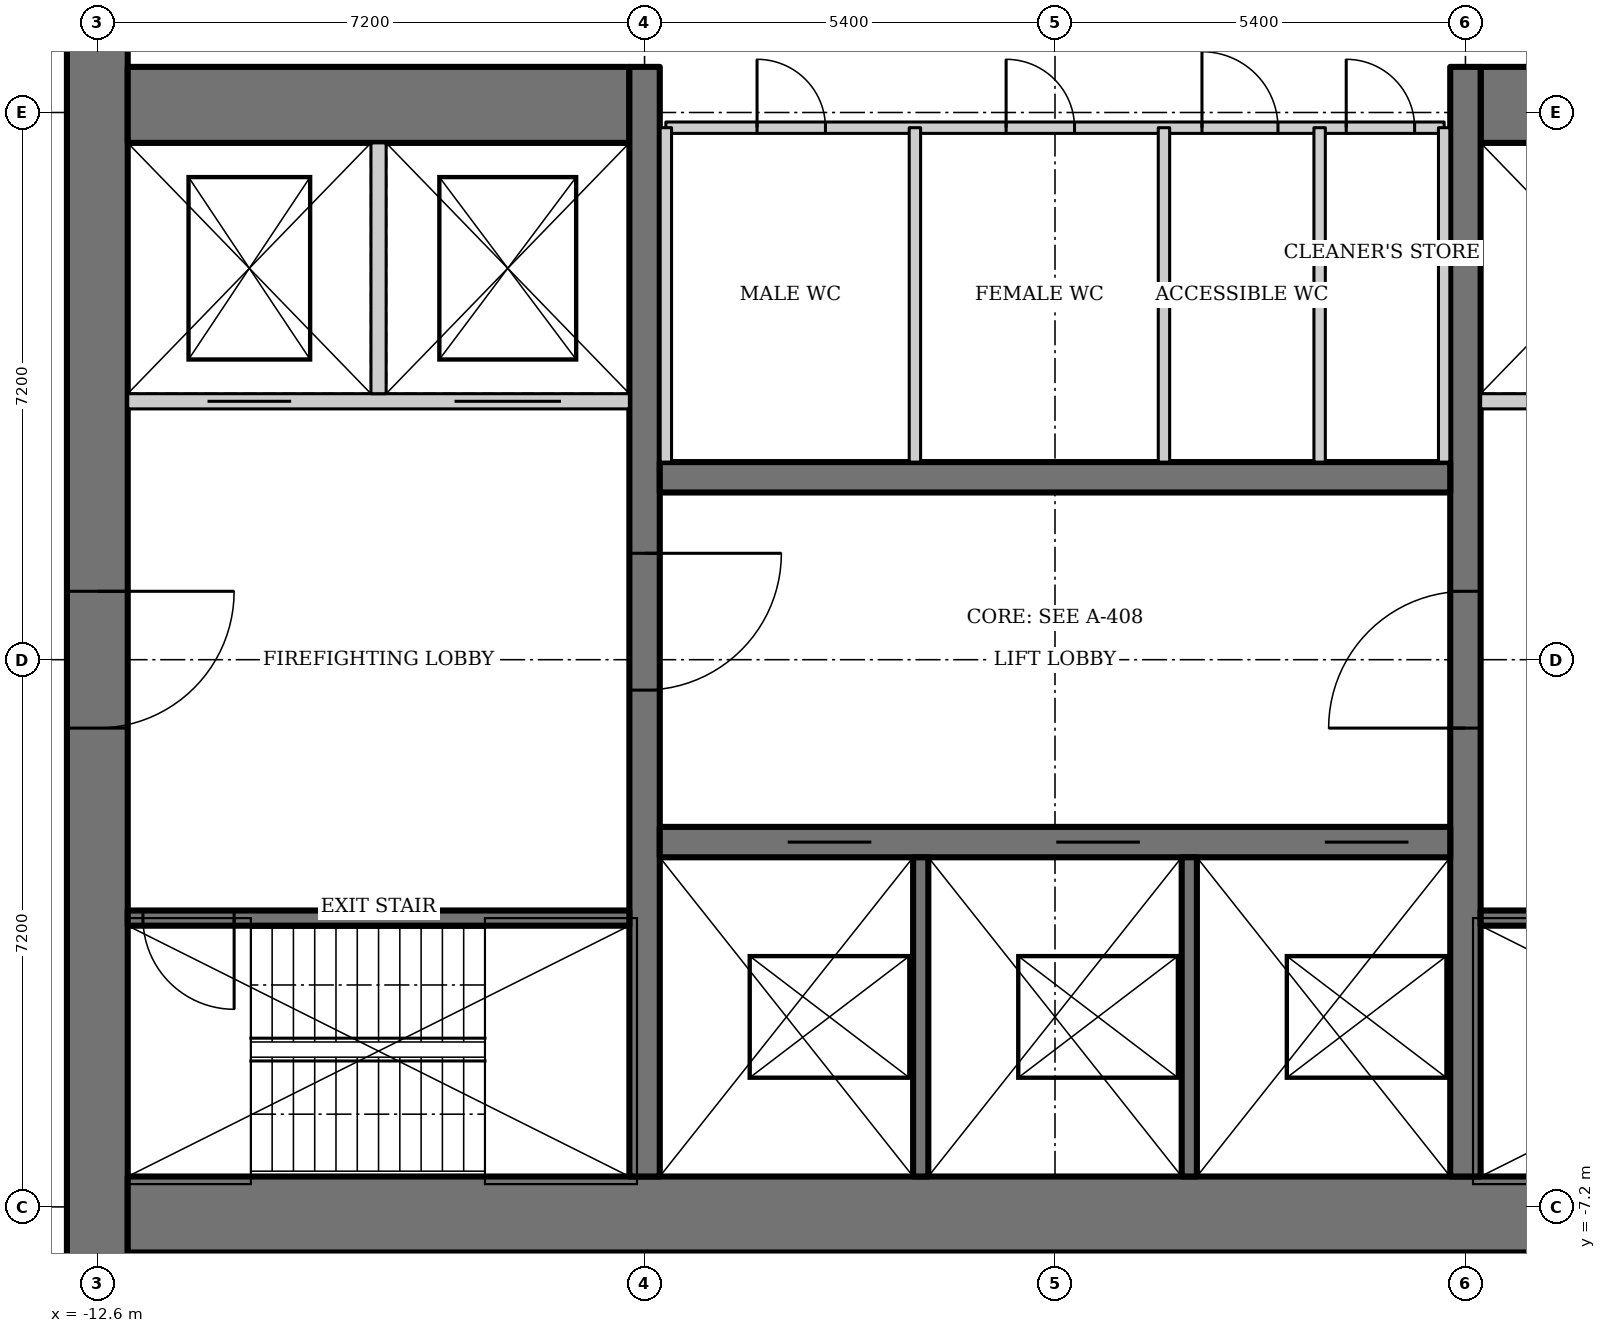
"""IFC4 building model, lengths in metres.
Left out: names, types, materials, properties, quantities, classifications, styles, units other than length and angle.
Written with IfcOpenShell. Run it as: python <this file> out.ifc"""

import sys

from ifc_helpers import new_model, si_unit, direction, frame, frame_2d, origin, place, context, subcontext, project, spatial, rectangle, extrude, element, fill, save


model = new_model("IFC4")
c1 = context("Model", 3, precision=1e-05, world=origin(), true_north=direction((0.0, 1.0)))
c2 = subcontext(c1, "Body", "Model", "MODEL_VIEW")
j1 = project(units=[si_unit("LENGTHUNIT", "METRE"), si_unit("PLANEANGLEUNIT", "RADIAN")], contexts=[c1])
p1 = place(None, origin())
s1 = spatial("IfcSite", under=j1, at=p1, CompositionType="ELEMENT")
p2 = place(p1, origin())
s2 = spatial("IfcBuilding", under=s1, at=p2, CompositionType="ELEMENT")
p3 = place(p2, frame((0.0, 0.0, 232.6)))
s3 = spatial("IfcBuildingStorey", under=s2, at=p3, CompositionType="ELEMENT", Elevation=232.6)
p4 = place(p3, frame((-12.6, 13.0, 0.0), z_axis=(0.0, 0.0, 1.0), x_axis=(0.0, -1.0, 0.0)))
e1 = element("IfcWall", 1, at=p4, inside=s3, PredefinedType="SHEAR", context=c2, shape_type="SweptSolid", body=[
    extrude(rectangle(XDim=26.0, YDim=0.8, at=frame_2d((13.0, 0.0))), origin(), (0.0, 0.0, 1.0), 4.2),
])
p5 = place(p4, frame((12.1, 0.0, 0.0)))
e2 = element("IfcOpeningElement", 2, at=p5, cuts=e1, PredefinedType="OPENING", context=c2, shape_type="SweptSolid", body=[
    extrude(rectangle(XDim=1.8, YDim=2.1, at=frame_2d((0.9, 1.05))), frame((0.0, 0.41, 0.0), z_axis=(0.0, -1.0, 0.0), x_axis=(1.0, 0.0, 0.0)), (0.0, 0.0, 1.0), 0.82),
])
p6 = place(p3, frame((-12.2, -7.3, 0.0), z_axis=(0.0, 0.0, 1.0), x_axis=(1.0, 0.0, 0.0)))
e3 = element("IfcWall", 3, at=p6, inside=s3, PredefinedType="SHEAR", context=c2, shape_type="SweptSolid", body=[
    extrude(rectangle(XDim=24.4, YDim=1.0, at=frame_2d((12.2, 0.0))), origin(), (0.0, 0.0, 1.0), 4.2),
])
for number, where, z_axis, x_axis in (
    (4, (12.2, 7.3, 0.0), (0.0, 0.0, 1.0), (-1.0, 0.0, 0.0)),
    (5, (-5.6, 7.3, 0.0), (0.0, 0.0, 1.0), (-1.0, 0.0, 0.0)),
):
    element("IfcWall", number, at=place(p3, frame(where, z_axis=z_axis, x_axis=x_axis)), inside=s3, PredefinedType="SHEAR", context=c2, shape_type="SweptSolid", body=[
        extrude(rectangle(XDim=6.6, YDim=1.0, at=frame_2d((3.3, 0.0))), origin(), (0.0, 0.0, 1.0), 4.2),
    ])
p7 = place(p3, frame((5.4, -6.8, 0.0), z_axis=(0.0, 0.0, 1.0), x_axis=(0.0, 1.0, 0.0)))
e6 = element("IfcWall", 6, at=p7, inside=s3, PredefinedType="SHEAR", context=c2, shape_type="SweptSolid", body=[
    extrude(rectangle(XDim=14.6, YDim=0.4, at=frame_2d((7.3, 0.0))), origin(), (0.0, 0.0, 1.0), 4.2),
])
p8 = place(p7, frame((5.9, 0.0, 0.0)))
e7 = element("IfcOpeningElement", 7, at=p8, cuts=e6, PredefinedType="OPENING", context=c2, shape_type="SweptSolid", body=[
    extrude(rectangle(XDim=1.8, YDim=2.1, at=frame_2d((0.9, 1.05))), frame((0.0, 0.21, 0.0), z_axis=(0.0, -1.0, 0.0), x_axis=(1.0, 0.0, 0.0)), (0.0, 0.0, 1.0), 0.42),
])
p9 = place(p3, frame((-5.4, 7.8, 0.0), z_axis=(0.0, 0.0, 1.0), x_axis=(0.0, -1.0, 0.0)))
e8 = element("IfcWall", 8, at=p9, inside=s3, PredefinedType="SHEAR", context=c2, shape_type="SweptSolid", body=[
    extrude(rectangle(XDim=14.6, YDim=0.4, at=frame_2d((7.3, 0.0))), origin(), (0.0, 0.0, 1.0), 4.2),
])
p10 = place(p9, frame((6.4, 0.0, 0.0)))
e9 = element("IfcOpeningElement", 9, at=p10, cuts=e8, PredefinedType="OPENING", context=c2, shape_type="SweptSolid", body=[
    extrude(rectangle(XDim=1.8, YDim=2.1, at=frame_2d((0.9, 1.05))), frame((0.0, 0.21, 0.0), z_axis=(0.0, -1.0, 0.0), x_axis=(1.0, 0.0, 0.0)), (0.0, 0.0, 1.0), 0.42),
])
p11 = place(p3, frame((-5.2, -2.4, 0.0), z_axis=(0.0, 0.0, 1.0), x_axis=(1.0, 0.0, 0.0)))
e10 = element("IfcWall", 10, at=p11, inside=s3, PredefinedType="SHEAR", context=c2, shape_type="SweptSolid", body=[
    extrude(rectangle(XDim=10.4, YDim=0.4, at=frame_2d((5.2, 0.0))), origin(), (0.0, 0.0, 1.0), 4.2),
])
p12 = place(p11, frame((1.683, 0.0, 0.0)))
e11 = element("IfcOpeningElement", 11, at=p12, cuts=e10, PredefinedType="OPENING", context=c2, shape_type="SweptSolid", body=[
    extrude(rectangle(XDim=1.1, YDim=2.2, at=frame_2d((0.55, 1.1))), frame((0.0, 0.21, 0.0), z_axis=(0.0, -1.0, 0.0), x_axis=(1.0, 0.0, 0.0)), (0.0, 0.0, 1.0), 0.42),
])
p13 = place(p11, frame((5.217, 0.0, 0.0)))
e12 = element("IfcOpeningElement", 12, at=p13, cuts=e10, PredefinedType="OPENING", context=c2, shape_type="SweptSolid", body=[
    extrude(rectangle(XDim=1.1, YDim=2.2, at=frame_2d((0.55, 1.1))), frame((0.0, 0.21, 0.0), z_axis=(0.0, -1.0, 0.0), x_axis=(1.0, 0.0, 0.0)), (0.0, 0.0, 1.0), 0.42),
])
p14 = place(p11, frame((8.75, 0.0, 0.0)))
e13 = element("IfcOpeningElement", 13, at=p14, cuts=e10, PredefinedType="OPENING", context=c2, shape_type="SweptSolid", body=[
    extrude(rectangle(XDim=1.1, YDim=2.2, at=frame_2d((0.55, 1.1))), frame((0.0, 0.21, 0.0), z_axis=(0.0, -1.0, 0.0), x_axis=(1.0, 0.0, 0.0)), (0.0, 0.0, 1.0), 0.42),
])
for number, where, z_axis, x_axis in (
    (14, (-1.767, -2.6, 0.0), (0.0, 0.0, 1.0), (0.0, -1.0, 0.0)),
    (15, (1.767, -2.6, 0.0), (0.0, 0.0, 1.0), (0.0, -1.0, 0.0)),
):
    element("IfcWall", number, at=place(p3, frame(where, z_axis=z_axis, x_axis=x_axis)), inside=s3, PredefinedType="SOLIDWALL", context=c2, shape_type="SweptSolid", body=[
        extrude(rectangle(XDim=4.2, YDim=0.2, at=frame_2d((2.1, 0.0))), origin(), (0.0, 0.0, 1.0), 4.2),
    ])
p15 = place(p3, frame((5.2, 2.4, 0.0), z_axis=(0.0, 0.0, 1.0), x_axis=(-1.0, 0.0, 0.0)))
e16 = element("IfcWall", 16, at=p15, inside=s3, PredefinedType="SHEAR", context=c2, shape_type="SweptSolid", body=[
    extrude(rectangle(XDim=10.4, YDim=0.4, at=frame_2d((5.2, 0.0))), origin(), (0.0, 0.0, 1.0), 4.2),
])
p16 = place(p3, frame((5.6, -3.4, 0.0), z_axis=(0.0, 0.0, 1.0), x_axis=(1.0, 0.0, 0.0)))
e17 = element("IfcWall", 17, at=p16, inside=s3, PredefinedType="SHEAR", context=c2, shape_type="SweptSolid", body=[
    extrude(rectangle(XDim=6.6, YDim=0.2, at=frame_2d((3.3, 0.0))), origin(), (0.0, 0.0, 1.0), 4.2),
])
p17 = place(p16, frame((5.2, 0.0, 0.0)))
e18 = element("IfcOpeningElement", 18, at=p17, cuts=e17, PredefinedType="OPENING", context=c2, shape_type="SweptSolid", body=[
    extrude(rectangle(XDim=1.2, YDim=2.1, at=frame_2d((0.6, 1.05))), frame((0.0, 0.11, 0.0), z_axis=(0.0, -1.0, 0.0), x_axis=(1.0, 0.0, 0.0)), (0.0, 0.0, 1.0), 0.22),
])
p18 = place(p3, frame((12.2, 3.4, 0.0), z_axis=(0.0, 0.0, 1.0), x_axis=(-1.0, 0.0, 0.0)))
e19 = element("IfcWall", 19, at=p18, inside=s3, PredefinedType="SOLIDWALL", context=c2, shape_type="SweptSolid", body=[
    extrude(rectangle(XDim=6.6, YDim=0.2, at=frame_2d((3.3, 0.0))), origin(), (0.0, 0.0, 1.0), 4.2),
])
p19 = place(p18, frame((4.45, 0.0, 0.0)))
e20 = element("IfcOpeningElement", 20, at=p19, cuts=e19, PredefinedType="OPENING", context=c2, shape_type="SweptSolid", body=[
    extrude(rectangle(XDim=1.1, YDim=2.2, at=frame_2d((0.55, 1.1))), frame((0.0, 0.11, 0.0), z_axis=(0.0, -1.0, 0.0), x_axis=(1.0, 0.0, 0.0)), (0.0, 0.0, 1.0), 0.22),
])
p20 = place(p18, frame((0.9, 0.0, 0.0)))
e21 = element("IfcOpeningElement", 21, at=p20, cuts=e19, PredefinedType="OPENING", context=c2, shape_type="SweptSolid", body=[
    extrude(rectangle(XDim=1.4, YDim=2.2, at=frame_2d((0.7, 1.1))), frame((0.0, 0.11, 0.0), z_axis=(0.0, -1.0, 0.0), x_axis=(1.0, 0.0, 0.0)), (0.0, 0.0, 1.0), 0.22),
])
p21 = place(p3, frame((-5.6, -3.4, 0.0), z_axis=(0.0, 0.0, 1.0), x_axis=(-1.0, 0.0, 0.0)))
e22 = element("IfcWall", 22, at=p21, inside=s3, PredefinedType="SHEAR", context=c2, shape_type="SweptSolid", body=[
    extrude(rectangle(XDim=6.6, YDim=0.2, at=frame_2d((3.3, 0.0))), origin(), (0.0, 0.0, 1.0), 4.2),
])
p22 = place(p21, frame((5.2, 0.0, 0.0)))
e23 = element("IfcOpeningElement", 23, at=p22, cuts=e22, PredefinedType="OPENING", context=c2, shape_type="SweptSolid", body=[
    extrude(rectangle(XDim=1.2, YDim=2.1, at=frame_2d((0.6, 1.05))), frame((0.0, 0.11, 0.0), z_axis=(0.0, -1.0, 0.0), x_axis=(1.0, 0.0, 0.0)), (0.0, 0.0, 1.0), 0.22),
])
p23 = place(p3, frame((-12.2, 3.4, 0.0), z_axis=(0.0, 0.0, 1.0), x_axis=(1.0, 0.0, 0.0)))
e24 = element("IfcWall", 24, at=p23, inside=s3, PredefinedType="SOLIDWALL", context=c2, shape_type="SweptSolid", body=[
    extrude(rectangle(XDim=6.6, YDim=0.2, at=frame_2d((3.3, 0.0))), origin(), (0.0, 0.0, 1.0), 4.2),
])
p24 = place(p23, frame((1.05, 0.0, 0.0)))
e25 = element("IfcOpeningElement", 25, at=p24, cuts=e24, PredefinedType="OPENING", context=c2, shape_type="SweptSolid", body=[
    extrude(rectangle(XDim=1.1, YDim=2.2, at=frame_2d((0.55, 1.1))), frame((0.0, 0.11, 0.0), z_axis=(0.0, -1.0, 0.0), x_axis=(1.0, 0.0, 0.0)), (0.0, 0.0, 1.0), 0.22),
])
p25 = place(p23, frame((4.3, 0.0, 0.0)))
e26 = element("IfcOpeningElement", 26, at=p25, cuts=e24, PredefinedType="OPENING", context=c2, shape_type="SweptSolid", body=[
    extrude(rectangle(XDim=1.4, YDim=2.2, at=frame_2d((0.7, 1.1))), frame((0.0, 0.11, 0.0), z_axis=(0.0, -1.0, 0.0), x_axis=(1.0, 0.0, 0.0)), (0.0, 0.0, 1.0), 0.22),
])
p26 = place(p3, frame((-8.9, 3.5, 0.0), z_axis=(0.0, 0.0, 1.0), x_axis=(0.0, 1.0, 0.0)))
e27 = element("IfcWall", 27, at=p26, inside=s3, PredefinedType="SOLIDWALL", context=c2, shape_type="SweptSolid", body=[
    extrude(rectangle(XDim=3.3, YDim=0.2, at=frame_2d((1.65, 0.0))), origin(), (0.0, 0.0, 1.0), 4.2),
])
p27 = place(p3, frame((-9.893, 10.245, 0.0), z_axis=(0.0, 0.0, 1.0), x_axis=(-0.886174439647, -0.463351769735, 0.0)))
e28 = element("IfcWall", 28, at=p27, inside=s3, PredefinedType="PARTITIONING", context=c2, shape_type="SweptSolid", body=[
    extrude(rectangle(XDim=4.735, YDim=0.15, at=frame_2d((2.367, 0.0))), origin(), (0.0, 0.0, 1.0), 4.05),
])
p28 = place(p27, frame((0.15, 0.0, 0.0)))
e29 = element("IfcOpeningElement", 29, at=p28, cuts=e28, PredefinedType="OPENING", context=c2, shape_type="SweptSolid", body=[
    extrude(rectangle(XDim=0.9, YDim=2.1, at=frame_2d((0.45, 1.05))), frame((0.0, 0.085, 0.0), z_axis=(0.0, -1.0, 0.0), x_axis=(1.0, 0.0, 0.0)), (0.0, 0.0, 1.0), 0.17),
])
p29 = place(p3, frame((-5.12, 7.0, 0.0), z_axis=(0.0, 0.0, 1.0), x_axis=(1.0, 0.0, 0.0)))
e30 = element("IfcWall", 30, at=p29, inside=s3, PredefinedType="SOLIDWALL", context=c2, shape_type="SweptSolid", body=[
    extrude(rectangle(XDim=10.24, YDim=0.15, at=frame_2d((5.12, 0.0))), origin(), (0.0, 0.0, 1.0), 4.05),
])
p30 = place(p29, frame((1.2, 0.0, 0.0)))
e31 = element("IfcOpeningElement", 31, at=p30, cuts=e30, PredefinedType="OPENING", context=c2, shape_type="SweptSolid", body=[
    extrude(rectangle(XDim=0.9, YDim=2.1, at=frame_2d((0.45, 1.05))), frame((0.0, 0.085, 0.0), z_axis=(0.0, -1.0, 0.0), x_axis=(1.0, 0.0, 0.0)), (0.0, 0.0, 1.0), 0.17),
])
p31 = place(p29, frame((4.477, 0.0, 0.0)))
e32 = element("IfcOpeningElement", 32, at=p31, cuts=e30, PredefinedType="OPENING", context=c2, shape_type="SweptSolid", body=[
    extrude(rectangle(XDim=0.9, YDim=2.1, at=frame_2d((0.45, 1.05))), frame((0.0, 0.085, 0.0), z_axis=(0.0, -1.0, 0.0), x_axis=(1.0, 0.0, 0.0)), (0.0, 0.0, 1.0), 0.17),
])
p32 = place(p29, frame((7.054, 0.0, 0.0)))
e33 = element("IfcOpeningElement", 33, at=p32, cuts=e30, PredefinedType="OPENING", context=c2, shape_type="SweptSolid", body=[
    extrude(rectangle(XDim=1.0, YDim=2.1, at=frame_2d((0.5, 1.05))), frame((0.0, 0.085, 0.0), z_axis=(0.0, -1.0, 0.0), x_axis=(1.0, 0.0, 0.0)), (0.0, 0.0, 1.0), 0.17),
])
p33 = place(p29, frame((8.952, 0.0, 0.0)))
e34 = element("IfcOpeningElement", 34, at=p33, cuts=e30, PredefinedType="OPENING", context=c2, shape_type="SweptSolid", body=[
    extrude(rectangle(XDim=0.9, YDim=2.1, at=frame_2d((0.45, 1.05))), frame((0.0, 0.085, 0.0), z_axis=(0.0, -1.0, 0.0), x_axis=(1.0, 0.0, 0.0)), (0.0, 0.0, 1.0), 0.17),
])
for number, where, z_axis, x_axis in (
    (35, (-5.12, 2.6, 0.0), (0.0, 0.0, 1.0), (0.0, 1.0, 0.0)),
    (36, (5.12, 2.6, 0.0), (0.0, 0.0, 1.0), (0.0, 1.0, 0.0)),
    (37, (-1.843, 2.6, 0.0), (0.0, 0.0, 1.0), (0.0, 1.0, 0.0)),
):
    element("IfcWall", number, at=place(p3, frame(where, z_axis=z_axis, x_axis=x_axis)), inside=s3, PredefinedType="SOLIDWALL", context=c2, shape_type="SweptSolid", body=[
        extrude(rectangle(XDim=4.4, YDim=0.15, at=frame_2d((2.2, 0.0))), origin(), (0.0, 0.0, 1.0), 4.05),
    ])
p34 = place(p3, frame((1.434, 2.6, 0.0), z_axis=(0.0, 0.0, 1.0), x_axis=(0.0, 1.0, 0.0)))
e38 = element("IfcWall", 38, at=p34, inside=s3, PredefinedType="SOLIDWALL", context=c2, shape_type="SweptSolid", body=[
    extrude(rectangle(XDim=4.4, YDim=0.15, at=frame_2d((2.2, 0.0))), origin(), (0.0, 0.0, 1.0), 3.108),
])
p35 = place(p3, frame((3.482, 2.6, 0.0), z_axis=(0.0, 0.0, 1.0), x_axis=(0.0, 1.0, 0.0)))
e39 = element("IfcWall", 39, at=p35, inside=s3, PredefinedType="SOLIDWALL", context=c2, shape_type="SweptSolid", body=[
    extrude(rectangle(XDim=4.4, YDim=0.15, at=frame_2d((2.2, 0.0))), origin(), (0.0, 0.0, 1.0), 4.05),
])
p36 = place(p8, origin())
e40 = element("IfcDoor", 40, at=p36, inside=s3, OperationType="DOUBLE_DOOR_DOUBLE_SWING", PredefinedType="DOOR", context=c2, shape_type="SweptSolid", body=[
    extrude(rectangle(XDim=1.8, YDim=2.1, at=frame_2d((0.9, 1.05))), frame((0.0, 0.025, 0.0), z_axis=(0.0, -1.0, 0.0), x_axis=(1.0, 0.0, 0.0)), (0.0, 0.0, 1.0), 0.05),
])
fill(e7, e40)
p37 = place(p10, origin())
e41 = element("IfcDoor", 41, at=p37, inside=s3, OperationType="DOUBLE_DOOR_DOUBLE_SWING", PredefinedType="DOOR", context=c2, shape_type="SweptSolid", body=[
    extrude(rectangle(XDim=1.8, YDim=2.1, at=frame_2d((0.9, 1.05))), frame((0.0, 0.025, 0.0), z_axis=(0.0, -1.0, 0.0), x_axis=(1.0, 0.0, 0.0)), (0.0, 0.0, 1.0), 0.05),
])
fill(e9, e41)
p38 = place(p22, origin())
e42 = element("IfcDoor", 42, at=p38, inside=s3, OperationType="SINGLE_SWING_RIGHT", PredefinedType="DOOR", context=c2, shape_type="SweptSolid", body=[
    extrude(rectangle(XDim=1.2, YDim=2.1, at=frame_2d((0.6, 1.05))), frame((0.0, 0.025, 0.0), z_axis=(0.0, -1.0, 0.0), x_axis=(1.0, 0.0, 0.0)), (0.0, 0.0, 1.0), 0.05),
])
fill(e23, e42)
p39 = place(p5, origin())
e43 = element("IfcDoor", 43, at=p39, inside=s3, OperationType="DOUBLE_DOOR_DOUBLE_SWING", PredefinedType="DOOR", context=c2, shape_type="SweptSolid", body=[
    extrude(rectangle(XDim=1.8, YDim=2.1, at=frame_2d((0.9, 1.05))), frame((0.0, 0.025, 0.0), z_axis=(0.0, -1.0, 0.0), x_axis=(1.0, 0.0, 0.0)), (0.0, 0.0, 1.0), 0.05),
])
fill(e2, e43)
p40 = place(p12, origin())
e44 = element("IfcDoor", 44, at=p40, inside=s3, OperationType="DOUBLE_DOOR_SLIDING", PredefinedType="DOOR", context=c2, shape_type="SweptSolid", body=[
    extrude(rectangle(XDim=1.1, YDim=2.2, at=frame_2d((0.55, 1.1))), frame((0.0, 0.025, 0.0), z_axis=(0.0, -1.0, 0.0), x_axis=(1.0, 0.0, 0.0)), (0.0, 0.0, 1.0), 0.05),
])
fill(e11, e44)
p41 = place(p13, origin())
e45 = element("IfcDoor", 45, at=p41, inside=s3, OperationType="DOUBLE_DOOR_SLIDING", PredefinedType="DOOR", context=c2, shape_type="SweptSolid", body=[
    extrude(rectangle(XDim=1.1, YDim=2.2, at=frame_2d((0.55, 1.1))), frame((0.0, 0.025, 0.0), z_axis=(0.0, -1.0, 0.0), x_axis=(1.0, 0.0, 0.0)), (0.0, 0.0, 1.0), 0.05),
])
fill(e12, e45)
p42 = place(p14, origin())
e46 = element("IfcDoor", 46, at=p42, inside=s3, OperationType="DOUBLE_DOOR_SLIDING", PredefinedType="DOOR", context=c2, shape_type="SweptSolid", body=[
    extrude(rectangle(XDim=1.1, YDim=2.2, at=frame_2d((0.55, 1.1))), frame((0.0, 0.025, 0.0), z_axis=(0.0, -1.0, 0.0), x_axis=(1.0, 0.0, 0.0)), (0.0, 0.0, 1.0), 0.05),
])
fill(e13, e46)
p43 = place(p24, origin())
e47 = element("IfcDoor", 47, at=p43, inside=s3, OperationType="DOUBLE_DOOR_SLIDING", PredefinedType="DOOR", context=c2, shape_type="SweptSolid", body=[
    extrude(rectangle(XDim=1.1, YDim=2.2, at=frame_2d((0.55, 1.1))), frame((0.0, 0.025, 0.0), z_axis=(0.0, -1.0, 0.0), x_axis=(1.0, 0.0, 0.0)), (0.0, 0.0, 1.0), 0.05),
])
fill(e25, e47)
p44 = place(p25, origin())
e48 = element("IfcDoor", 48, at=p44, inside=s3, OperationType="DOUBLE_DOOR_SLIDING", PredefinedType="DOOR", context=c2, shape_type="SweptSolid", body=[
    extrude(rectangle(XDim=1.4, YDim=2.2, at=frame_2d((0.7, 1.1))), frame((0.0, 0.025, 0.0), z_axis=(0.0, -1.0, 0.0), x_axis=(1.0, 0.0, 0.0)), (0.0, 0.0, 1.0), 0.05),
])
fill(e26, e48)
p45 = place(p30, origin())
e49 = element("IfcDoor", 49, at=p45, inside=s3, OperationType="SINGLE_SWING_LEFT", PredefinedType="DOOR", context=c2, shape_type="SweptSolid", body=[
    extrude(rectangle(XDim=0.9, YDim=2.1, at=frame_2d((0.45, 1.05))), frame((0.0, 0.025, 0.0), z_axis=(0.0, -1.0, 0.0), x_axis=(1.0, 0.0, 0.0)), (0.0, 0.0, 1.0), 0.05),
])
fill(e31, e49)
p46 = place(p31, origin())
e50 = element("IfcDoor", 50, at=p46, inside=s3, OperationType="SINGLE_SWING_LEFT", PredefinedType="DOOR", context=c2, shape_type="SweptSolid", body=[
    extrude(rectangle(XDim=0.9, YDim=2.1, at=frame_2d((0.45, 1.05))), frame((0.0, 0.025, 0.0), z_axis=(0.0, -1.0, 0.0), x_axis=(1.0, 0.0, 0.0)), (0.0, 0.0, 1.0), 0.05),
])
fill(e32, e50)
p47 = place(p32, origin())
e51 = element("IfcDoor", 51, at=p47, inside=s3, OperationType="SINGLE_SWING_LEFT", PredefinedType="DOOR", context=c2, shape_type="SweptSolid", body=[
    extrude(rectangle(XDim=1.0, YDim=2.1, at=frame_2d((0.5, 1.05))), frame((0.0, 0.025, 0.0), z_axis=(0.0, -1.0, 0.0), x_axis=(1.0, 0.0, 0.0)), (0.0, 0.0, 1.0), 0.05),
])
fill(e33, e51)
p48 = place(p33, origin())
e52 = element("IfcDoor", 52, at=p48, inside=s3, OperationType="SINGLE_SWING_LEFT", PredefinedType="DOOR", context=c2, shape_type="SweptSolid", body=[
    extrude(rectangle(XDim=0.9, YDim=2.1, at=frame_2d((0.45, 1.05))), frame((0.0, 0.025, 0.0), z_axis=(0.0, -1.0, 0.0), x_axis=(1.0, 0.0, 0.0)), (0.0, 0.0, 1.0), 0.05),
])
fill(e34, e52)
save(model, sys.argv[1])
